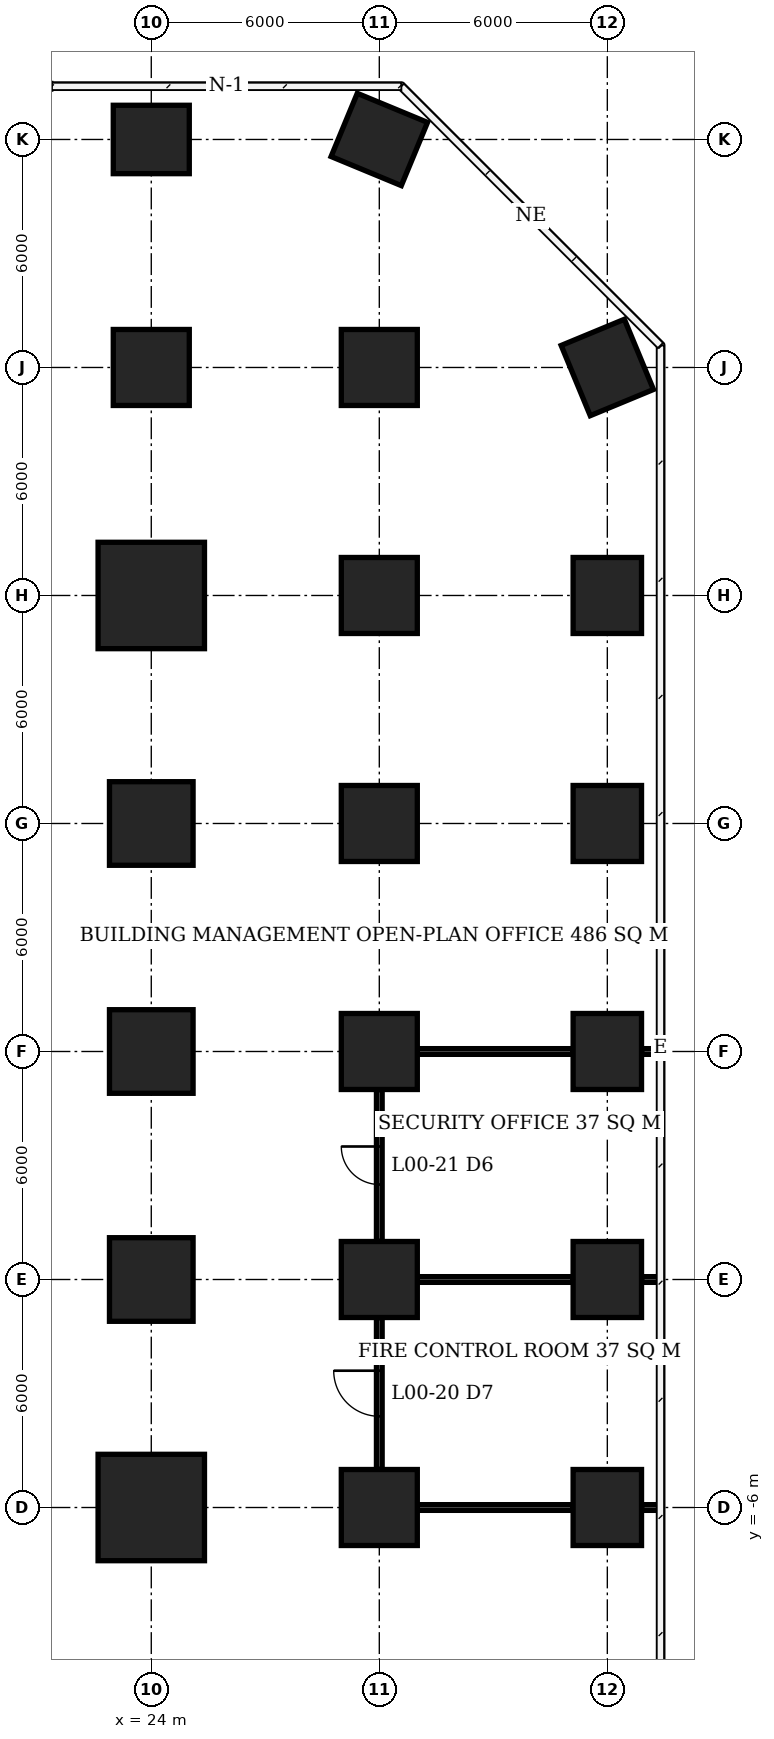
"""IFC4 building model, lengths in metres.
Left out: names, types, materials, properties, quantities, classifications, styles, units other than length and angle.
Written with IfcOpenShell. Run it as: python <this file> out.ifc"""

import sys

from ifc_helpers import new_model, si_unit, direction, frame, frame_2d, origin, origin_2d, place, context, subcontext, project, spatial, rectangle, extrude, element, fill, save


model = new_model("IFC4")
c1 = context("Model", 3, precision=1e-05, world=origin(), true_north=direction((0.0, 1.0)))
c2 = subcontext(c1, "Body", "Model", "MODEL_VIEW")
j1 = project(units=[si_unit("LENGTHUNIT", "METRE"), si_unit("PLANEANGLEUNIT", "RADIAN")], contexts=[c1])
p1 = place(None, origin())
s1 = spatial("IfcSite", under=j1, at=p1, CompositionType="ELEMENT")
p2 = place(p1, origin())
s2 = spatial("IfcBuilding", under=s1, at=p2, CompositionType="ELEMENT")
p3 = place(p2, origin())
s3 = spatial("IfcBuildingStorey", under=s2, at=p3, CompositionType="ELEMENT", Elevation=0.0)
p4 = place(p3, frame((24.0, -6.0, -0.45), z_axis=(0.0, 0.0, 1.0), x_axis=(1.0, 0.0, 0.0)))
e1 = element("IfcColumn", 1, at=p4, inside=s3, PredefinedType="COLUMN", context=c2, shape_type="SweptSolid", body=[
    extrude(rectangle(XDim=2.8, YDim=2.8, at=origin_2d()), origin(), (0.0, 0.0, 1.0), 6.45),
])
for number, where, z_axis, x_axis in (
    (2, (24.0, 0.0, -0.45), (0.0, 0.0, 1.0), (1.0, 0.0, 0.0)),
    (3, (24.0, 6.0, -0.45), (0.0, 0.0, 1.0), (1.0, 0.0, 0.0)),
    (4, (24.0, 12.0, -0.45), (0.0, 0.0, 1.0), (1.0, 0.0, 0.0)),
):
    element("IfcColumn", number, at=place(p3, frame(where, z_axis=z_axis, x_axis=x_axis)), inside=s3, PredefinedType="COLUMN", context=c2, shape_type="SweptSolid", body=[
        extrude(rectangle(XDim=2.2, YDim=2.2, at=origin_2d()), origin(), (0.0, 0.0, 1.0), 6.45),
    ])
p5 = place(p3, frame((24.0, 18.0, -0.45), z_axis=(0.0, 0.0, 1.0), x_axis=(1.0, 0.0, 0.0)))
e5 = element("IfcColumn", 5, at=p5, inside=s3, PredefinedType="COLUMN", context=c2, shape_type="SweptSolid", body=[
    extrude(rectangle(XDim=2.8, YDim=2.8, at=origin_2d()), origin(), (0.0, 0.0, 1.0), 6.45),
])
p6 = place(p3, frame((24.0, 24.0, -0.45), z_axis=(0.0, 0.0, 1.0), x_axis=(1.0, 0.0, 0.0)))
e6 = element("IfcColumn", 6, at=p6, inside=s3, PredefinedType="COLUMN", context=c2, shape_type="SweptSolid", body=[
    extrude(rectangle(XDim=2.0, YDim=2.0, at=origin_2d()), origin(), (0.0, 0.0, 1.0), 6.45),
])
p7 = place(p3, frame((24.0, 30.0, -0.45), z_axis=(0.0, 0.0, 1.0), x_axis=(1.0, 0.0, 0.0)))
e7 = element("IfcColumn", 7, at=p7, inside=s3, PredefinedType="COLUMN", context=c2, shape_type="SweptSolid", body=[
    extrude(rectangle(XDim=2.0, YDim=1.8, at=origin_2d()), origin(), (0.0, 0.0, 1.0), 6.45),
])
for number, where, z_axis, x_axis in (
    (8, (30.0, -6.0, -0.45), (0.0, 0.0, 1.0), (1.0, 0.0, 0.0)),
    (9, (30.0, 0.0, -0.45), (0.0, 0.0, 1.0), (1.0, 0.0, 0.0)),
    (10, (30.0, 6.0, -0.45), (0.0, 0.0, 1.0), (1.0, 0.0, 0.0)),
    (11, (30.0, 12.0, -0.45), (0.0, 0.0, 1.0), (1.0, 0.0, 0.0)),
    (12, (30.0, 18.0, -0.45), (0.0, 0.0, 1.0), (1.0, 0.0, 0.0)),
):
    element("IfcColumn", number, at=place(p3, frame(where, z_axis=z_axis, x_axis=x_axis)), inside=s3, PredefinedType="COLUMN", context=c2, shape_type="SweptSolid", body=[
        extrude(rectangle(XDim=2.0, YDim=2.0, at=origin_2d()), origin(), (0.0, 0.0, 1.0), 6.45),
    ])
p8 = place(p3, frame((30.0, 24.0, 0.0), z_axis=(0.0, 0.0, 1.0), x_axis=(1.0, 0.0, 0.0)))
e13 = element("IfcColumn", 13, at=p8, inside=s3, PredefinedType="COLUMN", context=c2, shape_type="SweptSolid", body=[
    extrude(rectangle(XDim=2.0, YDim=2.0, at=origin_2d()), origin(), (0.0, 0.0, 1.0), 6.0),
])
p9 = place(p3, frame((30.0, 30.0, 0.0), z_axis=(0.0, 0.0, 1.0), x_axis=(0.923879532511, -0.382683432365, 0.0)))
e14 = element("IfcColumn", 14, at=p9, inside=s3, PredefinedType="COLUMN", context=c2, shape_type="SweptSolid", body=[
    extrude(rectangle(XDim=2.0, YDim=1.8, at=origin_2d()), origin(), (0.0, 0.0, 1.0), 6.0),
])
for number, where, z_axis, x_axis in (
    (15, (36.0, -6.0, -0.45), (0.0, 0.0, 1.0), (0.0, 1.0, 0.0)),
    (16, (36.0, 0.0, -0.45), (0.0, 0.0, 1.0), (0.0, 1.0, 0.0)),
    (17, (36.0, 6.0, -0.45), (0.0, 0.0, 1.0), (0.0, 1.0, 0.0)),
    (18, (36.0, 12.0, -0.45), (0.0, 0.0, 1.0), (0.0, 1.0, 0.0)),
    (19, (36.0, 18.0, -0.45), (0.0, 0.0, 1.0), (0.0, 1.0, 0.0)),
):
    element("IfcColumn", number, at=place(p3, frame(where, z_axis=z_axis, x_axis=x_axis)), inside=s3, PredefinedType="COLUMN", context=c2, shape_type="SweptSolid", body=[
        extrude(rectangle(XDim=2.0, YDim=1.8, at=origin_2d()), origin(), (0.0, 0.0, 1.0), 6.45),
    ])
p10 = place(p3, frame((36.0, 24.0, 0.0), z_axis=(0.0, 0.0, 1.0), x_axis=(0.382683432365, -0.923879532511, 0.0)))
e20 = element("IfcColumn", 20, at=p10, inside=s3, PredefinedType="COLUMN", context=c2, shape_type="SweptSolid", body=[
    extrude(rectangle(XDim=2.0, YDim=1.8, at=origin_2d()), origin(), (0.0, 0.0, 1.0), 6.0),
])
p11 = place(p3, frame((31.0, -6.0, 0.0), z_axis=(0.0, 0.0, 1.0), x_axis=(1.0, 0.0, 0.0)))
e21 = element("IfcWall", 21, at=p11, inside=s3, PredefinedType="PARTITIONING", context=c2, shape_type="SweptSolid", body=[
    extrude(rectangle(XDim=4.1, YDim=0.15, at=frame_2d((2.05, 0.0))), origin(), (0.0, 0.0, 1.0), 5.75),
])
p12 = place(p3, frame((36.9, -6.0, 0.0), z_axis=(0.0, 0.0, 1.0), x_axis=(1.0, 0.0, 0.0)))
e22 = element("IfcWall", 22, at=p12, inside=s3, PredefinedType="PARTITIONING", context=c2, shape_type="SweptSolid", body=[
    extrude(rectangle(XDim=0.475, YDim=0.15, at=frame_2d((0.238, 0.0))), origin(), (0.0, 0.0, 1.0), 5.75),
])
p13 = place(p3, frame((31.0, 0.0, 0.0), z_axis=(0.0, 0.0, 1.0), x_axis=(1.0, 0.0, 0.0)))
e23 = element("IfcWall", 23, at=p13, inside=s3, PredefinedType="PARTITIONING", context=c2, shape_type="SweptSolid", body=[
    extrude(rectangle(XDim=4.1, YDim=0.15, at=frame_2d((2.05, 0.0))), origin(), (0.0, 0.0, 1.0), 5.75),
])
p14 = place(p3, frame((36.9, 0.0, 0.0), z_axis=(0.0, 0.0, 1.0), x_axis=(1.0, 0.0, 0.0)))
e24 = element("IfcWall", 24, at=p14, inside=s3, PredefinedType="PARTITIONING", context=c2, shape_type="SweptSolid", body=[
    extrude(rectangle(XDim=0.45, YDim=0.15, at=frame_2d((0.225, 0.0))), origin(), (0.0, 0.0, 1.0), 5.75),
])
p15 = place(p3, frame((31.0, 6.0, 0.0), z_axis=(0.0, 0.0, 1.0), x_axis=(1.0, 0.0, 0.0)))
e25 = element("IfcWall", 25, at=p15, inside=s3, PredefinedType="PARTITIONING", context=c2, shape_type="SweptSolid", body=[
    extrude(rectangle(XDim=4.1, YDim=0.15, at=frame_2d((2.05, 0.0))), origin(), (0.0, 0.0, 1.0), 5.75),
])
p16 = place(p3, frame((36.9, 6.0, 0.0), z_axis=(0.0, 0.0, 1.0), x_axis=(1.0, 0.0, 0.0)))
e26 = element("IfcWall", 26, at=p16, inside=s3, PredefinedType="PARTITIONING", context=c2, shape_type="SweptSolid", body=[
    extrude(rectangle(XDim=0.45, YDim=0.15, at=frame_2d((0.225, 0.0))), origin(), (0.0, 0.0, 1.0), 5.75),
])
p17 = place(p3, frame((30.0, -5.0, 0.0), z_axis=(0.0, 0.0, 1.0), x_axis=(0.0, 1.0, 0.0)))
e27 = element("IfcWall", 27, at=p17, inside=s3, PredefinedType="PARTITIONING", context=c2, shape_type="SweptSolid", body=[
    extrude(rectangle(XDim=4.0, YDim=0.15, at=frame_2d((2.0, 0.0))), origin(), (0.0, 0.0, 1.0), 5.75),
])
p18 = place(p17, frame((1.4, 0.0, 0.0)))
e28 = element("IfcOpeningElement", 28, at=p18, cuts=e27, PredefinedType="OPENING", context=c2, shape_type="SweptSolid", body=[
    extrude(rectangle(XDim=1.2, YDim=2.4, at=frame_2d((0.6, 1.2))), frame((0.0, 0.085, 0.0), z_axis=(0.0, -1.0, 0.0), x_axis=(1.0, 0.0, 0.0)), (0.0, 0.0, 1.0), 0.17),
])
p19 = place(p3, frame((30.0, 1.0, 0.0), z_axis=(0.0, 0.0, 1.0), x_axis=(0.0, 1.0, 0.0)))
e29 = element("IfcWall", 29, at=p19, inside=s3, PredefinedType="PARTITIONING", context=c2, shape_type="SweptSolid", body=[
    extrude(rectangle(XDim=4.0, YDim=0.15, at=frame_2d((2.0, 0.0))), origin(), (0.0, 0.0, 1.0), 5.75),
])
p20 = place(p19, frame((1.5, 0.0, 0.0)))
e30 = element("IfcOpeningElement", 30, at=p20, cuts=e29, PredefinedType="OPENING", context=c2, shape_type="SweptSolid", body=[
    extrude(rectangle(XDim=1.0, YDim=2.1, at=frame_2d((0.5, 1.05))), frame((0.0, 0.085, 0.0), z_axis=(0.0, -1.0, 0.0), x_axis=(1.0, 0.0, 0.0)), (0.0, 0.0, 1.0), 0.17),
])
p21 = place(p18, origin())
e31 = element("IfcDoor", 31, at=p21, inside=s3, OperationType="SINGLE_SWING_RIGHT", PredefinedType="DOOR", context=c2, shape_type="SweptSolid", body=[
    extrude(rectangle(XDim=1.2, YDim=2.4, at=frame_2d((0.6, 1.2))), frame((0.0, 0.025, 0.0), z_axis=(0.0, -1.0, 0.0), x_axis=(1.0, 0.0, 0.0)), (0.0, 0.0, 1.0), 0.05),
])
fill(e28, e31)
p22 = place(p20, origin())
e32 = element("IfcDoor", 32, at=p22, inside=s3, OperationType="SINGLE_SWING_RIGHT", PredefinedType="DOOR", context=c2, shape_type="SweptSolid", body=[
    extrude(rectangle(XDim=1.0, YDim=2.1, at=frame_2d((0.5, 1.05))), frame((0.0, 0.025, 0.0), z_axis=(0.0, -1.0, 0.0), x_axis=(1.0, 0.0, 0.0)), (0.0, 0.0, 1.0), 0.05),
])
fill(e30, e32)
save(model, sys.argv[1])
